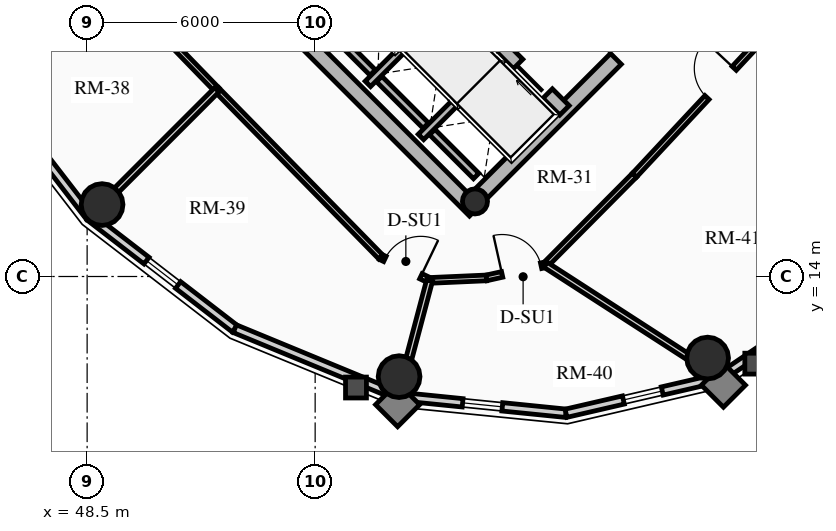
"""IFC4 building model, lengths in metres.
Left out: names, types, materials, properties, quantities, classifications, styles, units other than length and angle.
Written with IfcOpenShell. Run it as: python <this file> out.ifc"""

import sys

from ifc_helpers import new_model, si_unit, direction, frame, frame_2d, origin, origin_2d, place, context, subcontext, project, spatial, rectangle, circle, hollow_circle, extrude, source, transform, mapped, element, fill, save


model = new_model("IFC4")
c1 = context("Model", 3, precision=1e-05, world=origin(), true_north=direction((0.0, 1.0)))
c2 = subcontext(c1, "Body", "Model", "MODEL_VIEW")
j1 = project(units=[si_unit("LENGTHUNIT", "METRE"), si_unit("PLANEANGLEUNIT", "RADIAN")], contexts=[c1])
p1 = place(None, origin())
s1 = spatial("IfcSite", under=j1, at=p1, CompositionType="ELEMENT")
p2 = place(p1, origin())
s2 = spatial("IfcBuilding", under=s1, at=p2, CompositionType="ELEMENT")
p3 = place(p2, frame((0.0, 0.0, 208.3)))
s3 = spatial("IfcBuildingStorey", under=s2, at=p3, CompositionType="ELEMENT", Elevation=208.3)
p4 = place(p3, frame((58.702, 15.732, 0.0), z_axis=(0.0, 0.0, 1.0), x_axis=(-0.707106781187, 0.707106781187, 0.0)))
e1 = element("IfcWall", 1, at=p4, inside=s3, PredefinedType="SHEAR", context=c2, shape_type="SweptSolid", body=[
    extrude(rectangle(XDim=14.1, YDim=0.4, at=frame_2d((7.05, 0.0))), origin(), (0.0, 0.0, 1.0), 2.91),
])
p5 = place(p3, frame((58.561, 15.873, 0.0), z_axis=(0.0, 0.0, 1.0), x_axis=(0.707106781187, 0.707106781187, 0.0)))
e2 = element("IfcWall", 2, at=p5, inside=s3, PredefinedType="SHEAR", context=c2, shape_type="SweptSolid", body=[
    extrude(rectangle(XDim=10.7, YDim=0.4, at=frame_2d((5.35, 0.0))), origin(), (0.0, 0.0, 1.0), 2.91),
])
m1 = source(origin(), c2, "Body", "SweptSolid", [
    extrude(rectangle(XDim=1.5, YDim=2.02, at=frame_2d((0.75, 1.01))), frame((0.0, 0.21, 0.0), z_axis=(0.0, -1.0, 0.0), x_axis=(1.0, 0.0, 0.0)), (0.0, 0.0, 1.0), 0.42),
])
p6 = place(p5, frame((5.45, 0.0, 0.0)))
e3 = element("IfcOpeningElement", 3, at=p6, cuts=e2, PredefinedType="OPENING", context=c2, shape_type="MappedRepresentation", body=[
    mapped(m1, transform((0.0, 0.0, 0.0), x_axis=(1.0, 0.0, 0.0), y_axis=(0.0, 1.0, 0.0), z_axis=(0.0, 0.0, 1.0), scale=1.0)),
])
p7 = place(p3, frame((61.06, 18.373, 0.0), z_axis=(0.0, 0.0, 1.0), x_axis=(-0.707106781187, 0.707106781187, 0.0)))
e4 = element("IfcWall", 4, at=p7, inside=s3, PredefinedType="SHEAR", context=c2, shape_type="SweptSolid", body=[
    extrude(rectangle(XDim=13.7, YDim=0.35, at=frame_2d((6.85, 0.0))), origin(), (0.0, 0.0, 1.0), 2.91),
])
m2 = source(origin(), c2, "Body", "SweptSolid", [
    extrude(rectangle(XDim=1.1, YDim=2.015, at=frame_2d((0.55, 1.007))), frame((0.0, 0.185, 0.0), z_axis=(0.0, -1.0, 0.0), x_axis=(1.0, 0.0, 0.0)), (0.0, 0.0, 1.0), 0.37),
])
p8 = place(p7, frame((4.85, 0.0, 0.0)))
e5 = element("IfcOpeningElement", 5, at=p8, cuts=e4, PredefinedType="OPENING", context=c2, shape_type="MappedRepresentation", body=[
    mapped(m2, transform((0.0, 0.0, 0.0), x_axis=(1.0, 0.0, 0.0), y_axis=(0.0, 1.0, 0.0), z_axis=(0.0, 0.0, 1.0), scale=1.0)),
])
p9 = place(p7, frame((0.625, 0.0, 0.0)))
e6 = element("IfcOpeningElement", 6, at=p9, cuts=e4, PredefinedType="OPENING", context=c2, shape_type="MappedRepresentation", body=[
    mapped(m2, transform((0.0, 0.0, 0.0), x_axis=(1.0, 0.0, 0.0), y_axis=(0.0, 1.0, 0.0), z_axis=(0.0, 0.0, 1.0), scale=1.0)),
])
p10 = place(p7, frame((2.625, 0.0, 0.0)))
e7 = element("IfcOpeningElement", 7, at=p10, cuts=e4, PredefinedType="OPENING", context=c2, shape_type="MappedRepresentation", body=[
    mapped(m2, transform((0.0, 0.0, 0.0), x_axis=(1.0, 0.0, 0.0), y_axis=(0.0, 1.0, 0.0), z_axis=(0.0, 0.0, 1.0), scale=1.0)),
])
m3 = source(origin(), c2, "Body", "SweptSolid", [
    extrude(rectangle(XDim=1.15, YDim=2.02, at=frame_2d((0.575, 1.01))), frame((0.0, 0.185, 0.0), z_axis=(0.0, -1.0, 0.0), x_axis=(1.0, 0.0, 0.0)), (0.0, 0.0, 1.0), 0.37),
])
p11 = place(p7, frame((7.27, 0.0, 0.0)))
e8 = element("IfcOpeningElement", 8, at=p11, cuts=e4, PredefinedType="OPENING", context=c2, shape_type="MappedRepresentation", body=[
    mapped(m3, transform((0.0, 0.0, 0.0), x_axis=(1.0, 0.0, 0.0), y_axis=(0.0, 1.0, 0.0), z_axis=(0.0, 0.0, 1.0), scale=1.0)),
])
p12 = place(p3, frame((58.706, 15.976, 0.0), z_axis=(0.0, 0.0, 1.0), x_axis=(0.707106781187, 0.707106781187, 0.0)))
e9 = element("IfcColumn", 9, at=p12, inside=s3, PredefinedType="COLUMN", context=c2, shape_type="SweptSolid", body=[
    extrude(hollow_circle(Radius=0.33, WallThickness=0.025, at=origin_2d()), origin(), (0.0, 0.0, 1.0), 2.91),
])
for number, where, z_axis, x_axis in (
    (10, (48.893, 15.893, 0.0), (0.0, 0.0, 1.0), (1.0, 0.0, 0.0)),
    (11, (56.709, 11.365, 0.0), (0.0, 0.0, 1.0), (1.0, 0.0, 0.0)),
    (12, (64.827, 11.854, 0.0), (0.0, 0.0, 1.0), (1.0, 0.0, 0.0)),
):
    element("IfcColumn", number, at=place(p3, frame(where, z_axis=z_axis, x_axis=x_axis)), inside=s3, PredefinedType="USERDEFINED", context=c2, shape_type="SweptSolid", body=[
        extrude(circle(Radius=0.55, at=origin_2d()), origin(), (0.0, 0.0, 1.0), 2.91),
    ])
p13 = place(p3, frame((48.569, 15.569, 0.0), z_axis=(0.0, 0.0, 1.0), x_axis=(-0.610523083886, 0.791998462147, 0.0)))
e13 = element("IfcWall", 13, at=p13, inside=s3, PredefinedType="SOLIDWALL", context=c2, shape_type="SweptSolid", body=[
    extrude(rectangle(XDim=4.82, YDim=0.22, at=frame_2d((2.41, 0.0))), origin(), (0.0, 0.0, 1.0), 2.322),
])
p14 = place(p3, frame((52.387, 12.626, 0.0), z_axis=(0.0, 0.0, 1.0), x_axis=(-0.791998462147, 0.610523083886, 0.0)))
e14 = element("IfcWall", 14, at=p14, inside=s3, PredefinedType="SOLIDWALL", context=c2, shape_type="SweptSolid", body=[
    extrude(rectangle(XDim=4.82, YDim=0.22, at=frame_2d((2.41, 0.0))), origin(), (0.0, 0.0, 1.0), 2.322),
])
m4 = source(origin(), c2, "Body", "SweptSolid", [
    extrude(rectangle(XDim=1.05, YDim=1.3, at=frame_2d((0.525, 0.65))), frame((0.0, 0.12, 0.0), z_axis=(0.0, -1.0, 0.0), x_axis=(1.0, 0.0, 0.0)), (0.0, 0.0, 1.0), 0.24),
])
p15 = place(p14, frame((1.885, 0.0, 0.65)))
e15 = element("IfcOpeningElement", 15, at=p15, cuts=e14, PredefinedType="OPENING", context=c2, shape_type="MappedRepresentation", body=[
    mapped(m4, transform((0.0, 0.0, 0.0), x_axis=(1.0, 0.0, 0.0), y_axis=(0.0, 1.0, 0.0), z_axis=(0.0, 0.0, 1.0), scale=1.0)),
])
p16 = place(p3, frame((56.705, 10.845, 0.0), z_axis=(0.0, 0.0, 1.0), x_axis=(-0.924447353237, 0.381309704956, 0.0)))
e16 = element("IfcWall", 16, at=p16, inside=s3, PredefinedType="SOLIDWALL", context=c2, shape_type="SweptSolid", body=[
    extrude(rectangle(XDim=4.671, YDim=0.22, at=frame_2d((2.335, 0.0))), origin(), (0.0, 0.0, 1.0), 2.322),
])
p17 = place(p3, frame((61.1, 10.401, 0.0), z_axis=(0.0, 0.0, 1.0), x_axis=(-0.994929930991, 0.100570534541, 0.0)))
e17 = element("IfcWall", 17, at=p17, inside=s3, PredefinedType="SOLIDWALL", context=c2, shape_type="SweptSolid", body=[
    extrude(rectangle(XDim=4.418, YDim=0.22, at=frame_2d((2.209, 0.0))), origin(), (0.0, 0.0, 1.0), 2.322),
])
p18 = place(p17, frame((1.684, 0.0, 0.65)))
e18 = element("IfcOpeningElement", 18, at=p18, cuts=e17, PredefinedType="OPENING", context=c2, shape_type="MappedRepresentation", body=[
    mapped(m4, transform((0.0, 0.0, 0.0), x_axis=(1.0, 0.0, 0.0), y_axis=(0.0, 1.0, 0.0), z_axis=(0.0, 0.0, 1.0), scale=1.0)),
])
p19 = place(p3, frame((65.144, 11.337, 0.0), z_axis=(0.0, 0.0, 1.0), x_axis=(-0.974249228678, -0.225473813158, 0.0)))
e19 = element("IfcWall", 19, at=p19, inside=s3, PredefinedType="SOLIDWALL", context=c2, shape_type="SweptSolid", body=[
    extrude(rectangle(XDim=4.15, YDim=0.22, at=frame_2d((2.075, 0.0))), origin(), (0.0, 0.0, 1.0), 2.322),
])
p20 = place(p19, frame((1.55, 0.0, 0.65)))
e20 = element("IfcOpeningElement", 20, at=p20, cuts=e19, PredefinedType="OPENING", context=c2, shape_type="MappedRepresentation", body=[
    mapped(m4, transform((0.0, 0.0, 0.0), x_axis=(1.0, 0.0, 0.0), y_axis=(0.0, 1.0, 0.0), z_axis=(0.0, 0.0, 1.0), scale=1.0)),
])
p21 = place(p3, frame((68.439, 13.561, 0.0), z_axis=(0.0, 0.0, 1.0), x_axis=(-0.828833723692, -0.559495003079, 0.0)))
e21 = element("IfcWall", 21, at=p21, inside=s3, PredefinedType="SOLIDWALL", context=c2, shape_type="SweptSolid", body=[
    extrude(rectangle(XDim=3.976, YDim=0.22, at=frame_2d((1.988, 0.0))), origin(), (0.0, 0.0, 1.0), 2.322),
])
p22 = place(p3, frame((55.888, 19.069, 0.0), z_axis=(0.0, 0.0, 1.0), x_axis=(0.707106781187, 0.707106781187, 0.0)))
e22 = element("IfcWall", 22, at=p22, inside=s3, PredefinedType="SHEAR", context=c2, shape_type="SweptSolid", body=[
    extrude(rectangle(XDim=2.97, YDim=0.2, at=frame_2d((1.485, 0.0))), origin(), (0.0, 0.0, 1.0), 2.91),
])
p23 = place(p3, frame((56.015, 19.366, 0.0), z_axis=(0.0, 0.0, 1.0), x_axis=(-0.707106781187, 0.707106781187, 0.0)))
e23 = element("IfcWall", 23, at=p23, inside=s3, PredefinedType="SHEAR", context=c2, shape_type="SweptSolid", body=[
    extrude(rectangle(XDim=2.44, YDim=0.2, at=frame_2d((1.22, 0.0))), origin(), (0.0, 0.0, 1.0), 2.91),
])
p24 = place(p3, frame((57.284, 17.673, 0.0), z_axis=(0.0, 0.0, 1.0), x_axis=(0.707147878904, 0.70706568108, 0.0)))
e24 = element("IfcWall", 24, at=p24, inside=s3, PredefinedType="SHEAR", context=c2, shape_type="SweptSolid", body=[
    extrude(rectangle(XDim=2.97, YDim=0.2, at=frame_2d((1.485, 0.0))), origin(), (0.0, 0.0, 1.0), 2.91),
])
p25 = place(p3, frame((57.412, 17.97, 0.0), z_axis=(0.0, 0.0, 1.0), x_axis=(-0.707106781187, 0.707106781187, 0.0)))
e25 = element("IfcWall", 25, at=p25, inside=s3, PredefinedType="SHEAR", context=c2, shape_type="SweptSolid", body=[
    extrude(rectangle(XDim=1.735, YDim=0.2, at=frame_2d((0.867, 0.0))), origin(), (0.0, 0.0, 1.0), 2.91),
])
p26 = place(p3, frame((58.737, 16.644, 0.0), z_axis=(0.0, 0.0, 1.0), x_axis=(-0.707032117043, 0.707181437447, 0.0)))
e26 = element("IfcWall", 26, at=p26, inside=s3, PredefinedType="SHEAR", context=c2, shape_type="SweptSolid", body=[
    extrude(rectangle(XDim=1.635, YDim=0.2, at=frame_2d((0.817, 0.0))), origin(), (0.0, 0.0, 1.0), 2.91),
])
p27 = place(p3, frame((47.706, 23.253, 0.0), z_axis=(0.0, 0.0, 1.0), x_axis=(0.696179266346, -0.717867974707, 0.0)))
e27 = element("IfcWall", 27, at=p27, inside=s3, PredefinedType="PARTITIONING", context=c2, shape_type="SweptSolid", body=[
    extrude(rectangle(XDim=6.045, YDim=0.15, at=frame_2d((3.022, 0.0))), origin(), (0.0, 0.0, 1.0), 2.255),
])
p28 = place(p3, frame((51.914, 18.914, 0.0), z_axis=(0.0, 0.0, 1.0), x_axis=(0.699999313799, -0.714143515465, 0.0)))
e28 = element("IfcWall", 28, at=p28, inside=s3, PredefinedType="PARTITIONING", context=c2, shape_type="SweptSolid", body=[
    extrude(rectangle(XDim=6.162, YDim=0.15, at=frame_2d((3.081, 0.0))), origin(), (0.0, 0.0, 1.0), 2.255),
])
p29 = place(p3, frame((56.227, 14.513, 0.0), z_axis=(0.0, 0.0, 1.0), x_axis=(0.901477579283, -0.432825801044, 0.0)))
e29 = element("IfcWall", 29, at=p29, inside=s3, PredefinedType="PARTITIONING", context=c2, shape_type="SweptSolid", body=[
    extrude(rectangle(XDim=1.424, YDim=0.15, at=frame_2d((0.712, 0.0))), origin(), (0.0, 0.0, 1.0), 2.255),
])
m5 = source(origin(), c2, "Body", "SweptSolid", [
    extrude(rectangle(XDim=1.05, YDim=2.015, at=frame_2d((0.525, 1.007))), frame((0.0, 0.085, 0.0), z_axis=(0.0, -1.0, 0.0), x_axis=(1.0, 0.0, 0.0)), (0.0, 0.0, 1.0), 0.17),
])
p30 = place(p29, frame((0.12, 0.0, 0.0)))
e30 = element("IfcOpeningElement", 30, at=p30, cuts=e29, PredefinedType="OPENING", context=c2, shape_type="MappedRepresentation", body=[
    mapped(m5, transform((0.0, 0.0, 0.0), x_axis=(1.0, 0.0, 0.0), y_axis=(0.0, 1.0, 0.0), z_axis=(0.0, 0.0, 1.0), scale=1.0)),
])
p31 = place(p3, frame((57.511, 13.897, 0.0), z_axis=(0.0, 0.0, 1.0), x_axis=(0.999024538494, 0.044158481476, 0.0)))
e31 = element("IfcWall", 31, at=p31, inside=s3, PredefinedType="PARTITIONING", context=c2, shape_type="SweptSolid", body=[
    extrude(rectangle(XDim=1.498, YDim=0.15, at=frame_2d((0.749, 0.0))), origin(), (0.0, 0.0, 1.0), 2.322),
])
p32 = place(p3, frame((59.008, 13.963, 0.0), z_axis=(0.0, 0.0, 1.0), x_axis=(0.976020856791, 0.21767702476, 0.0)))
e32 = element("IfcWall", 32, at=p32, inside=s3, PredefinedType="PARTITIONING", context=c2, shape_type="SweptSolid", body=[
    extrude(rectangle(XDim=1.593, YDim=0.15, at=frame_2d((0.796, 0.0))), origin(), (0.0, 0.0, 1.0), 2.255),
])
p33 = place(p32, frame((0.423, 0.0, 0.0)))
e33 = element("IfcOpeningElement", 33, at=p33, cuts=e32, PredefinedType="OPENING", context=c2, shape_type="MappedRepresentation", body=[
    mapped(m5, transform((0.0, 0.0, 0.0), x_axis=(1.0, 0.0, 0.0), y_axis=(0.0, 1.0, 0.0), z_axis=(0.0, 0.0, 1.0), scale=1.0)),
])
p34 = place(p3, frame((60.562, 14.31, 0.0), z_axis=(0.0, 0.0, 1.0), x_axis=(0.704566236161, 0.709638230975, 0.0)))
e34 = element("IfcWall", 34, at=p34, inside=s3, PredefinedType="PARTITIONING", context=c2, shape_type="SweptSolid", body=[
    extrude(rectangle(XDim=3.321, YDim=0.15, at=frame_2d((1.661, 0.0))), origin(), (0.0, 0.0, 1.0), 2.322),
])
p35 = place(p3, frame((62.903, 16.667, 0.0), z_axis=(0.0, 0.0, 1.0), x_axis=(0.682371947497, 0.731005147225, 0.0)))
e35 = element("IfcWall", 35, at=p35, inside=s3, PredefinedType="PARTITIONING", context=c2, shape_type="SweptSolid", body=[
    extrude(rectangle(XDim=6.642, YDim=0.15, at=frame_2d((3.321, 0.0))), origin(), (0.0, 0.0, 1.0), 2.255),
])
p36 = place(p35, frame((2.796, 0.0, 0.0)))
e36 = element("IfcOpeningElement", 36, at=p36, cuts=e35, PredefinedType="OPENING", context=c2, shape_type="MappedRepresentation", body=[
    mapped(m5, transform((0.0, 0.0, 0.0), x_axis=(1.0, 0.0, 0.0), y_axis=(0.0, 1.0, 0.0), z_axis=(0.0, 0.0, 1.0), scale=1.0)),
])
p37 = place(p3, frame((51.914, 18.914, 0.0), z_axis=(0.0, 0.0, 1.0), x_axis=(-0.707106781187, -0.707106781187, 0.0)))
e37 = element("IfcWall", 37, at=p37, inside=s3, PredefinedType="PARTITIONING", context=c2, shape_type="SweptSolid", body=[
    extrude(rectangle(XDim=4.71, YDim=0.16, at=frame_2d((2.355, 0.0))), origin(), (0.0, 0.0, 1.0), 2.322),
])
p38 = place(p3, frame((57.511, 13.897, 0.0), z_axis=(0.0, 0.0, 1.0), x_axis=(-0.256174967125, -0.966630428974, 0.0)))
e38 = element("IfcWall", 38, at=p38, inside=s3, PredefinedType="PARTITIONING", context=c2, shape_type="SweptSolid", body=[
    extrude(rectangle(XDim=3.136, YDim=0.16, at=frame_2d((1.568, 0.0))), origin(), (0.0, 0.0, 1.0), 2.322),
])
p39 = place(p3, frame((60.562, 14.31, 0.0), z_axis=(0.0, 0.0, 1.0), x_axis=(0.839858797161, -0.542804938105, 0.0)))
e39 = element("IfcWall", 39, at=p39, inside=s3, PredefinedType="PARTITIONING", context=c2, shape_type="SweptSolid", body=[
    extrude(rectangle(XDim=5.444, YDim=0.16, at=frame_2d((2.722, 0.0))), origin(), (0.0, 0.0, 1.0), 2.322),
])
p40 = place(p3, frame((47.706, 23.253, 0.0), z_axis=(0.0, 0.0, 1.0), x_axis=(-0.471384756618, -0.881927667799, 0.0)))
e40 = element("IfcWall", 40, at=p40, inside=s3, PredefinedType="PARTITIONING", context=c2, shape_type="SweptSolid", body=[
    extrude(rectangle(XDim=4.374, YDim=0.125, at=frame_2d((2.187, 0.0))), origin(), (0.0, 0.0, 1.0), 2.255),
])
m6 = source(origin(), c2, "Body", "SweptSolid", [
    extrude(rectangle(XDim=0.9, YDim=2.005, at=frame_2d((0.45, 1.002))), frame((0.0, 0.073, 0.0), z_axis=(0.0, -1.0, 0.0), x_axis=(1.0, 0.0, 0.0)), (0.0, 0.0, 1.0), 0.145),
])
p41 = place(p40, frame((1.674, 0.0, 0.0)))
e41 = element("IfcOpeningElement", 41, at=p41, cuts=e40, PredefinedType="OPENING", context=c2, shape_type="MappedRepresentation", body=[
    mapped(m6, transform((0.0, 0.0, 0.0), x_axis=(1.0, 0.0, 0.0), y_axis=(0.0, 1.0, 0.0), z_axis=(0.0, 0.0, 1.0), scale=1.0)),
])
m7 = source(origin(), c2, "Body", "SweptSolid", [
    extrude(rectangle(XDim=1.05, YDim=1.3, at=frame_2d((0.525, 0.65))), frame((0.0, 0.03, 0.0), z_axis=(0.0, -1.0, 0.0), x_axis=(1.0, 0.0, 0.0)), (0.0, 0.0, 1.0), 0.06),
])
p42 = place(p15, origin())
e42 = element("IfcWindow", 42, at=p42, inside=s3, PartitioningType="SINGLE_PANEL", PredefinedType="WINDOW", context=c2, shape_type="MappedRepresentation", body=[
    mapped(m7, transform((0.0, 0.0, 0.0), x_axis=(1.0, 0.0, 0.0), y_axis=(0.0, 1.0, 0.0), z_axis=(0.0, 0.0, 1.0), scale=1.0)),
])
fill(e15, e42)
p43 = place(p18, origin())
e43 = element("IfcWindow", 43, at=p43, inside=s3, PartitioningType="SINGLE_PANEL", PredefinedType="WINDOW", context=c2, shape_type="MappedRepresentation", body=[
    mapped(m7, transform((0.0, 0.0, 0.0), x_axis=(1.0, 0.0, 0.0), y_axis=(0.0, 1.0, 0.0), z_axis=(0.0, 0.0, 1.0), scale=1.0)),
])
fill(e18, e43)
p44 = place(p20, origin())
e44 = element("IfcWindow", 44, at=p44, inside=s3, PartitioningType="SINGLE_PANEL", PredefinedType="WINDOW", context=c2, shape_type="MappedRepresentation", body=[
    mapped(m7, transform((0.0, 0.0, 0.0), x_axis=(1.0, 0.0, 0.0), y_axis=(0.0, 1.0, 0.0), z_axis=(0.0, 0.0, 1.0), scale=1.0)),
])
fill(e20, e44)
m8 = source(origin(), c2, "Body", "SweptSolid", [
    extrude(rectangle(XDim=1.1, YDim=2.015, at=frame_2d((0.55, 1.007))), frame((0.0, 0.025, 0.0), z_axis=(0.0, -1.0, 0.0), x_axis=(1.0, 0.0, 0.0)), (0.0, 0.0, 1.0), 0.05),
])
p45 = place(p9, origin())
e45 = element("IfcDoor", 45, at=p45, inside=s3, OperationType="SLIDING_TO_RIGHT", PredefinedType="DOOR", context=c2, shape_type="MappedRepresentation", body=[
    mapped(m8, transform((0.0, 0.0, 0.0), x_axis=(1.0, 0.0, 0.0), y_axis=(0.0, 1.0, 0.0), z_axis=(0.0, 0.0, 1.0), scale=1.0)),
])
fill(e6, e45)
m9 = source(origin(), c2, "Body", "SweptSolid", [
    extrude(rectangle(XDim=1.5, YDim=2.02, at=frame_2d((0.75, 1.01))), frame((0.0, 0.025, 0.0), z_axis=(0.0, -1.0, 0.0), x_axis=(1.0, 0.0, 0.0)), (0.0, 0.0, 1.0), 0.05),
])
p46 = place(p6, origin())
e46 = element("IfcDoor", 46, at=p46, inside=s3, OperationType="DOUBLE_DOOR_SINGLE_SWING", PredefinedType="DOOR", context=c2, shape_type="MappedRepresentation", body=[
    mapped(m9, transform((0.0, 0.0, 0.0), x_axis=(1.0, 0.0, 0.0), y_axis=(0.0, 1.0, 0.0), z_axis=(0.0, 0.0, 1.0), scale=1.0)),
])
fill(e3, e46)
m10 = source(origin(), c2, "Body", "SweptSolid", [
    extrude(rectangle(XDim=1.05, YDim=2.015, at=frame_2d((0.525, 1.007))), frame((0.0, 0.025, 0.0), z_axis=(0.0, -1.0, 0.0), x_axis=(1.0, 0.0, 0.0)), (0.0, 0.0, 1.0), 0.05),
])
p47 = place(p30, origin())
e47 = element("IfcDoor", 47, at=p47, inside=s3, OperationType="SINGLE_SWING_RIGHT", PredefinedType="DOOR", context=c2, shape_type="MappedRepresentation", body=[
    mapped(m10, transform((0.0, 0.0, 0.0), x_axis=(1.0, 0.0, 0.0), y_axis=(0.0, 1.0, 0.0), z_axis=(0.0, 0.0, 1.0), scale=1.0)),
])
fill(e30, e47)
p48 = place(p33, origin())
e48 = element("IfcDoor", 48, at=p48, inside=s3, OperationType="SINGLE_SWING_LEFT", PredefinedType="DOOR", context=c2, shape_type="MappedRepresentation", body=[
    mapped(m10, transform((0.0, 0.0, 0.0), x_axis=(1.0, 0.0, 0.0), y_axis=(0.0, 1.0, 0.0), z_axis=(0.0, 0.0, 1.0), scale=1.0)),
])
fill(e33, e48)
p49 = place(p36, origin())
e49 = element("IfcDoor", 49, at=p49, inside=s3, OperationType="SINGLE_SWING_RIGHT", PredefinedType="DOOR", context=c2, shape_type="MappedRepresentation", body=[
    mapped(m10, transform((0.0, 0.0, 0.0), x_axis=(1.0, 0.0, 0.0), y_axis=(0.0, 1.0, 0.0), z_axis=(0.0, 0.0, 1.0), scale=1.0)),
])
fill(e36, e49)
save(model, sys.argv[1])
